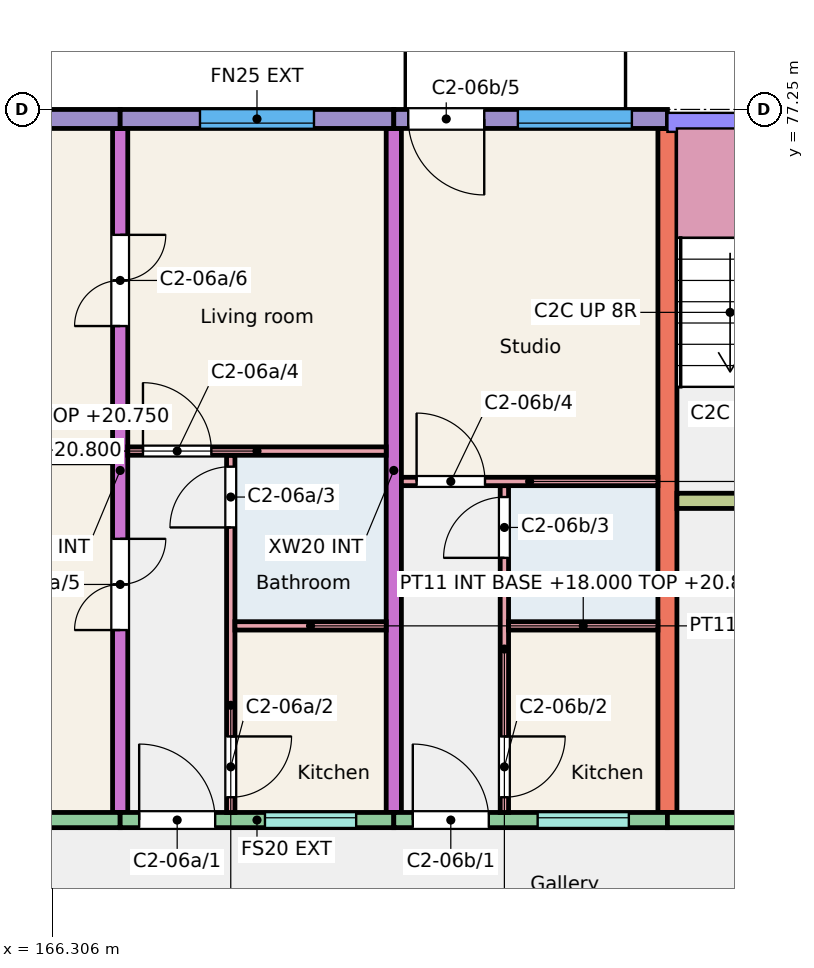
"""IFC4 building model, lengths in metres.
Left out: names, types, materials, properties, quantities, classifications, styles, units other than length and angle.
Written with IfcOpenShell. Run it as: python <this file> out.ifc"""

import sys

from ifc_helpers import new_model, si_unit, direction, frame, frame_2d, origin, place, context, subcontext, project, spatial, rectangle, extrude, element, fill, save


model = new_model("IFC4")
c1 = context("Model", 3, precision=1e-05, world=origin(), true_north=direction((0.0, 1.0)))
c2 = subcontext(c1, "Body", "Model", "MODEL_VIEW")
j1 = project(units=[si_unit("LENGTHUNIT", "METRE"), si_unit("PLANEANGLEUNIT", "RADIAN")], contexts=[c1])
p1 = place(None, origin())
s1 = spatial("IfcSite", under=j1, at=p1, CompositionType="ELEMENT")
p2 = place(p1, origin())
s2 = spatial("IfcBuilding", under=s1, at=p2, CompositionType="ELEMENT")
p3 = place(p2, frame((0.0, 0.0, 18.0)))
s3 = spatial("IfcBuildingStorey", under=s2, at=p3, CompositionType="ELEMENT", Elevation=18.0)
p4 = place(p3, frame((167.2, 68.0, 0.0), z_axis=(0.0, 0.0, 1.0), x_axis=(0.0, 1.0, 0.0)))
e1 = element("IfcWall", 1, at=p4, inside=s3, PredefinedType="SHEAR", context=c2, shape_type="SweptSolid", body=[
    extrude(rectangle(XDim=9.0, YDim=0.2, at=frame_2d((4.5, 0.0))), origin(), (0.0, 0.0, 1.0), 3.0),
])
p5 = place(p4, frame((2.4, 0.0, 0.0)))
e2 = element("IfcOpeningElement", 2, at=p5, cuts=e1, PredefinedType="OPENING", context=c2, shape_type="SweptSolid", body=[
    extrude(rectangle(XDim=1.2, YDim=2.1, at=frame_2d((0.6, 1.05))), frame((0.0, 0.11, 0.0), z_axis=(0.0, -1.0, 0.0), x_axis=(1.0, 0.0, 0.0)), (0.0, 0.0, 1.0), 0.22),
])
p6 = place(p4, frame((6.4, 0.0, 0.0)))
e3 = element("IfcOpeningElement", 3, at=p6, cuts=e1, PredefinedType="OPENING", context=c2, shape_type="SweptSolid", body=[
    extrude(rectangle(XDim=1.2, YDim=2.1, at=frame_2d((0.6, 1.05))), frame((0.0, 0.11, 0.0), z_axis=(0.0, -1.0, 0.0), x_axis=(1.0, 0.0, 0.0)), (0.0, 0.0, 1.0), 0.22),
])
p7 = place(p3, frame((170.8, 68.0, 0.0), z_axis=(0.0, 0.0, 1.0), x_axis=(0.0, 1.0, 0.0)))
e4 = element("IfcWall", 4, at=p7, inside=s3, PredefinedType="SHEAR", context=c2, shape_type="SweptSolid", body=[
    extrude(rectangle(XDim=9.0, YDim=0.2, at=frame_2d((4.5, 0.0))), origin(), (0.0, 0.0, 1.0), 3.0),
])
p8 = place(p3, frame((174.4, 68.0, 0.0), z_axis=(0.0, 0.0, 1.0), x_axis=(0.0, 1.0, 0.0)))
e5 = element("IfcWall", 5, at=p8, inside=s3, PredefinedType="SHEAR", context=c2, shape_type="SweptSolid", body=[
    extrude(rectangle(XDim=9.0, YDim=0.25, at=frame_2d((4.5, 0.0))), origin(), (0.0, 0.0, 1.0), 3.0),
])
p9 = place(p3, frame((163.6, 77.125, 0.0), z_axis=(0.0, 0.0, 1.0), x_axis=(1.0, 0.0, 0.0)))
e6 = element("IfcWall", 6, at=p9, inside=s3, PredefinedType="SOLIDWALL", context=c2, shape_type="SweptSolid", body=[
    extrude(rectangle(XDim=3.6, YDim=0.25, at=frame_2d((1.8, 0.0))), origin(), (0.0, 0.0, 1.0), 3.0),
])
p10 = place(p9, frame((1.075, 0.0, 0.9)))
e7 = element("IfcOpeningElement", 7, at=p10, cuts=e6, PredefinedType="OPENING", context=c2, shape_type="SweptSolid", body=[
    extrude(rectangle(XDim=1.5, YDim=1.5, at=frame_2d((0.75, 0.75))), frame((0.0, 0.135, 0.0), z_axis=(0.0, -1.0, 0.0), x_axis=(1.0, 0.0, 0.0)), (0.0, 0.0, 1.0), 0.27),
])
p11 = place(p3, frame((163.75, 67.9, 0.0), z_axis=(0.0, 0.0, 1.0), x_axis=(1.0, 0.0, 0.0)))
e8 = element("IfcWall", 8, at=p11, inside=s3, PredefinedType="SOLIDWALL", context=c2, shape_type="SweptSolid", body=[
    extrude(rectangle(XDim=3.45, YDim=0.2, at=frame_2d((1.725, 0.0))), origin(), (0.0, 0.0, 1.0), 3.0),
])
p12 = place(p11, frame((0.925, 0.0, 0.9)))
e9 = element("IfcOpeningElement", 9, at=p12, cuts=e8, PredefinedType="OPENING", context=c2, shape_type="SweptSolid", body=[
    extrude(rectangle(XDim=1.5, YDim=1.5, at=frame_2d((0.75, 0.75))), frame((0.0, 0.11, 0.0), z_axis=(0.0, -1.0, 0.0), x_axis=(1.0, 0.0, 0.0)), (0.0, 0.0, 1.0), 0.22),
])
p13 = place(p3, frame((167.2, 77.125, 0.0), z_axis=(0.0, 0.0, 1.0), x_axis=(1.0, 0.0, 0.0)))
e10 = element("IfcWall", 10, at=p13, inside=s3, PredefinedType="SOLIDWALL", context=c2, shape_type="SweptSolid", body=[
    extrude(rectangle(XDim=3.6, YDim=0.25, at=frame_2d((1.8, 0.0))), origin(), (0.0, 0.0, 1.0), 3.0),
])
p14 = place(p13, frame((1.05, 0.0, 0.9)))
e11 = element("IfcOpeningElement", 11, at=p14, cuts=e10, PredefinedType="OPENING", context=c2, shape_type="SweptSolid", body=[
    extrude(rectangle(XDim=1.5, YDim=1.5, at=frame_2d((0.75, 0.75))), frame((0.0, 0.135, 0.0), z_axis=(0.0, -1.0, 0.0), x_axis=(1.0, 0.0, 0.0)), (0.0, 0.0, 1.0), 0.27),
])
p15 = place(p3, frame((167.2, 67.9, 0.0), z_axis=(0.0, 0.0, 1.0), x_axis=(1.0, 0.0, 0.0)))
e12 = element("IfcWall", 12, at=p15, inside=s3, PredefinedType="SOLIDWALL", context=c2, shape_type="SweptSolid", body=[
    extrude(rectangle(XDim=3.6, YDim=0.2, at=frame_2d((1.8, 0.0))), origin(), (0.0, 0.0, 1.0), 3.0),
])
p16 = place(p15, frame((1.905, 0.0, 1.1)))
e13 = element("IfcOpeningElement", 13, at=p16, cuts=e12, PredefinedType="OPENING", context=c2, shape_type="SweptSolid", body=[
    extrude(rectangle(XDim=1.2, YDim=1.3, at=frame_2d((0.6, 0.65))), frame((0.0, 0.11, 0.0), z_axis=(0.0, -1.0, 0.0), x_axis=(1.0, 0.0, 0.0)), (0.0, 0.0, 1.0), 0.22),
])
p17 = place(p15, frame((0.25, 0.0, 0.0)))
e14 = element("IfcOpeningElement", 14, at=p17, cuts=e12, PredefinedType="OPENING", context=c2, shape_type="SweptSolid", body=[
    extrude(rectangle(XDim=1.0, YDim=2.1, at=frame_2d((0.5, 1.05))), frame((0.0, 0.11, 0.0), z_axis=(0.0, -1.0, 0.0), x_axis=(1.0, 0.0, 0.0)), (0.0, 0.0, 1.0), 0.22),
])
p18 = place(p3, frame((170.8, 77.125, 0.0), z_axis=(0.0, 0.0, 1.0), x_axis=(1.0, 0.0, 0.0)))
e15 = element("IfcWall", 15, at=p18, inside=s3, PredefinedType="SOLIDWALL", context=c2, shape_type="SweptSolid", body=[
    extrude(rectangle(XDim=3.6, YDim=0.25, at=frame_2d((1.8, 0.0))), origin(), (0.0, 0.0, 1.0), 3.0),
])
p19 = place(p18, frame((1.633, 0.0, 0.9)))
e16 = element("IfcOpeningElement", 16, at=p19, cuts=e15, PredefinedType="OPENING", context=c2, shape_type="SweptSolid", body=[
    extrude(rectangle(XDim=1.5, YDim=1.5, at=frame_2d((0.75, 0.75))), frame((0.0, 0.135, 0.0), z_axis=(0.0, -1.0, 0.0), x_axis=(1.0, 0.0, 0.0)), (0.0, 0.0, 1.0), 0.27),
])
p20 = place(p18, frame((0.19, 0.0, 0.0)))
e17 = element("IfcOpeningElement", 17, at=p20, cuts=e15, PredefinedType="OPENING", context=c2, shape_type="SweptSolid", body=[
    extrude(rectangle(XDim=1.0, YDim=2.1, at=frame_2d((0.5, 1.05))), frame((0.0, 0.135, 0.0), z_axis=(0.0, -1.0, 0.0), x_axis=(1.0, 0.0, 0.0)), (0.0, 0.0, 1.0), 0.27),
])
p21 = place(p3, frame((170.8, 67.9, 0.0), z_axis=(0.0, 0.0, 1.0), x_axis=(1.0, 0.0, 0.0)))
e18 = element("IfcWall", 18, at=p21, inside=s3, PredefinedType="SOLIDWALL", context=c2, shape_type="SweptSolid", body=[
    extrude(rectangle(XDim=3.6, YDim=0.2, at=frame_2d((1.8, 0.0))), origin(), (0.0, 0.0, 1.0), 3.0),
])
p22 = place(p21, frame((1.893, 0.0, 1.1)))
e19 = element("IfcOpeningElement", 19, at=p22, cuts=e18, PredefinedType="OPENING", context=c2, shape_type="SweptSolid", body=[
    extrude(rectangle(XDim=1.2, YDim=1.3, at=frame_2d((0.6, 0.65))), frame((0.0, 0.11, 0.0), z_axis=(0.0, -1.0, 0.0), x_axis=(1.0, 0.0, 0.0)), (0.0, 0.0, 1.0), 0.22),
])
p23 = place(p21, frame((0.25, 0.0, 0.0)))
e20 = element("IfcOpeningElement", 20, at=p23, cuts=e18, PredefinedType="OPENING", context=c2, shape_type="SweptSolid", body=[
    extrude(rectangle(XDim=1.0, YDim=2.1, at=frame_2d((0.5, 1.05))), frame((0.0, 0.11, 0.0), z_axis=(0.0, -1.0, 0.0), x_axis=(1.0, 0.0, 0.0)), (0.0, 0.0, 1.0), 0.22),
])
p24 = place(p3, frame((174.4, 67.9, 0.0), z_axis=(0.0, 0.0, 1.0), x_axis=(1.0, 0.0, 0.0)))
e21 = element("IfcWall", 21, at=p24, inside=s3, PredefinedType="SHEAR", context=c2, shape_type="SweptSolid", body=[
    extrude(rectangle(XDim=5.85, YDim=0.2, at=frame_2d((2.925, 0.0))), origin(), (0.0, 0.0, 1.0), 3.0),
])
p25 = place(p24, frame((2.438, 0.0, 0.0)))
e22 = element("IfcOpeningElement", 22, at=p25, cuts=e21, PredefinedType="OPENING", context=c2, shape_type="SweptSolid", body=[
    extrude(rectangle(XDim=1.1, YDim=2.1, at=frame_2d((0.55, 1.05))), frame((0.0, 0.11, 0.0), z_axis=(0.0, -1.0, 0.0), x_axis=(1.0, 0.0, 0.0)), (0.0, 0.0, 1.0), 0.22),
])
p26 = place(p3, frame((174.525, 72.1, 0.0), z_axis=(0.0, 0.0, 1.0), x_axis=(1.0, 0.0, 0.0)))
e23 = element("IfcWall", 23, at=p26, inside=s3, PredefinedType="SHEAR", context=c2, shape_type="SweptSolid", body=[
    extrude(rectangle(XDim=5.725, YDim=0.2, at=frame_2d((2.863, 0.0))), origin(), (0.0, 0.0, 1.0), 3.0),
])
p27 = place(p26, frame((0.95, 0.0, 0.0)))
e24 = element("IfcOpeningElement", 24, at=p27, cuts=e23, PredefinedType="OPENING", context=c2, shape_type="SweptSolid", body=[
    extrude(rectangle(XDim=1.0, YDim=2.1, at=frame_2d((0.5, 1.05))), frame((0.0, 0.11, 0.0), z_axis=(0.0, -1.0, 0.0), x_axis=(1.0, 0.0, 0.0)), (0.0, 0.0, 1.0), 0.22),
])
p28 = place(p26, frame((3.863, 0.0, 0.0)))
e25 = element("IfcOpeningElement", 25, at=p28, cuts=e23, PredefinedType="OPENING", context=c2, shape_type="SweptSolid", body=[
    extrude(rectangle(XDim=1.1, YDim=2.1, at=frame_2d((0.55, 1.05))), frame((0.0, 0.11, 0.0), z_axis=(0.0, -1.0, 0.0), x_axis=(1.0, 0.0, 0.0)), (0.0, 0.0, 1.0), 0.22),
])
p29 = place(p3, frame((168.655, 68.0, 0.0), z_axis=(0.0, 0.0, 1.0), x_axis=(0.0, 1.0, 0.0)))
e26 = element("IfcWall", 26, at=p29, inside=s3, PredefinedType="PARTITIONING", context=c2, shape_type="SweptSolid", body=[
    extrude(rectangle(XDim=4.7, YDim=0.11, at=frame_2d((2.35, 0.0))), origin(), (0.0, 0.0, 1.0), 2.8),
])
p30 = place(p29, frame((0.2, 0.0, 0.0)))
e27 = element("IfcOpeningElement", 27, at=p30, cuts=e26, PredefinedType="OPENING", context=c2, shape_type="SweptSolid", body=[
    extrude(rectangle(XDim=0.8, YDim=2.1, at=frame_2d((0.4, 1.05))), frame((0.0, 0.065, 0.0), z_axis=(0.0, -1.0, 0.0), x_axis=(1.0, 0.0, 0.0)), (0.0, 0.0, 1.0), 0.13),
])
p31 = place(p29, frame((3.75, 0.0, 0.0)))
e28 = element("IfcOpeningElement", 28, at=p31, cuts=e26, PredefinedType="OPENING", context=c2, shape_type="SweptSolid", body=[
    extrude(rectangle(XDim=0.8, YDim=2.1, at=frame_2d((0.4, 1.05))), frame((0.0, 0.065, 0.0), z_axis=(0.0, -1.0, 0.0), x_axis=(1.0, 0.0, 0.0)), (0.0, 0.0, 1.0), 0.13),
])
p32 = place(p3, frame((168.71, 70.455, 0.0), z_axis=(0.0, 0.0, 1.0), x_axis=(1.0, 0.0, 0.0)))
e29 = element("IfcWall", 29, at=p32, inside=s3, PredefinedType="PARTITIONING", context=c2, shape_type="SweptSolid", body=[
    extrude(rectangle(XDim=1.99, YDim=0.11, at=frame_2d((0.995, 0.0))), origin(), (0.0, 0.0, 1.0), 2.8),
])
p33 = place(p3, frame((167.3, 72.755, 0.0), z_axis=(0.0, 0.0, 1.0), x_axis=(1.0, 0.0, 0.0)))
e30 = element("IfcWall", 30, at=p33, inside=s3, PredefinedType="PARTITIONING", context=c2, shape_type="SweptSolid", body=[
    extrude(rectangle(XDim=3.4, YDim=0.11, at=frame_2d((1.7, 0.0))), origin(), (0.0, 0.0, 1.0), 2.8),
])
p34 = place(p33, frame((0.2, 0.0, 0.0)))
e31 = element("IfcOpeningElement", 31, at=p34, cuts=e30, PredefinedType="OPENING", context=c2, shape_type="SweptSolid", body=[
    extrude(rectangle(XDim=0.9, YDim=2.1, at=frame_2d((0.45, 1.05))), frame((0.0, 0.065, 0.0), z_axis=(0.0, -1.0, 0.0), x_axis=(1.0, 0.0, 0.0)), (0.0, 0.0, 1.0), 0.13),
])
p35 = place(p3, frame((163.75, 72.655, 0.0), z_axis=(0.0, 0.0, 1.0), x_axis=(1.0, 0.0, 0.0)))
e32 = element("IfcWall", 32, at=p35, inside=s3, PredefinedType="PARTITIONING", context=c2, shape_type="SweptSolid", body=[
    extrude(rectangle(XDim=3.35, YDim=0.11, at=frame_2d((1.675, 0.0))), origin(), (0.0, 0.0, 1.0), 2.75),
])
p36 = place(p3, frame((172.255, 68.0, 0.0), z_axis=(0.0, 0.0, 1.0), x_axis=(0.0, 1.0, 0.0)))
e33 = element("IfcWall", 33, at=p36, inside=s3, PredefinedType="PARTITIONING", context=c2, shape_type="SweptSolid", body=[
    extrude(rectangle(XDim=4.3, YDim=0.11, at=frame_2d((2.15, 0.0))), origin(), (0.0, 0.0, 1.0), 2.8),
])
p37 = place(p36, frame((0.2, 0.0, 0.0)))
e34 = element("IfcOpeningElement", 34, at=p37, cuts=e33, PredefinedType="OPENING", context=c2, shape_type="SweptSolid", body=[
    extrude(rectangle(XDim=0.8, YDim=2.1, at=frame_2d((0.4, 1.05))), frame((0.0, 0.065, 0.0), z_axis=(0.0, -1.0, 0.0), x_axis=(1.0, 0.0, 0.0)), (0.0, 0.0, 1.0), 0.13),
])
p38 = place(p36, frame((3.35, 0.0, 0.0)))
e35 = element("IfcOpeningElement", 35, at=p38, cuts=e33, PredefinedType="OPENING", context=c2, shape_type="SweptSolid", body=[
    extrude(rectangle(XDim=0.8, YDim=2.1, at=frame_2d((0.4, 1.05))), frame((0.0, 0.065, 0.0), z_axis=(0.0, -1.0, 0.0), x_axis=(1.0, 0.0, 0.0)), (0.0, 0.0, 1.0), 0.13),
])
p39 = place(p3, frame((172.31, 70.455, 0.0), z_axis=(0.0, 0.0, 1.0), x_axis=(1.0, 0.0, 0.0)))
e36 = element("IfcWall", 36, at=p39, inside=s3, PredefinedType="PARTITIONING", context=c2, shape_type="SweptSolid", body=[
    extrude(rectangle(XDim=1.965, YDim=0.11, at=frame_2d((0.982, 0.0))), origin(), (0.0, 0.0, 1.0), 2.8),
])
p40 = place(p3, frame((170.9, 72.355, 0.0), z_axis=(0.0, 0.0, 1.0), x_axis=(1.0, 0.0, 0.0)))
e37 = element("IfcWall", 37, at=p40, inside=s3, PredefinedType="PARTITIONING", context=c2, shape_type="SweptSolid", body=[
    extrude(rectangle(XDim=3.375, YDim=0.11, at=frame_2d((1.688, 0.0))), origin(), (0.0, 0.0, 1.0), 2.8),
])
p41 = place(p40, frame((0.2, 0.0, 0.0)))
e38 = element("IfcOpeningElement", 38, at=p41, cuts=e37, PredefinedType="OPENING", context=c2, shape_type="SweptSolid", body=[
    extrude(rectangle(XDim=0.9, YDim=2.1, at=frame_2d((0.45, 1.05))), frame((0.0, 0.065, 0.0), z_axis=(0.0, -1.0, 0.0), x_axis=(1.0, 0.0, 0.0)), (0.0, 0.0, 1.0), 0.13),
])
p42 = place(p16, origin())
e39 = element("IfcWindow", 39, at=p42, inside=s3, PartitioningType="SINGLE_PANEL", PredefinedType="WINDOW", context=c2, shape_type="SweptSolid", body=[
    extrude(rectangle(XDim=1.2, YDim=1.3, at=frame_2d((0.6, 0.65))), frame((0.0, 0.06, 0.0), z_axis=(0.0, -1.0, 0.0), x_axis=(1.0, 0.0, 0.0)), (0.0, 0.0, 1.0), 0.06),
])
fill(e13, e39)
p43 = place(p14, origin())
e40 = element("IfcWindow", 40, at=p43, inside=s3, PartitioningType="SINGLE_PANEL", PredefinedType="WINDOW", context=c2, shape_type="SweptSolid", body=[
    extrude(rectangle(XDim=1.5, YDim=1.5, at=frame_2d((0.75, 0.75))), frame((0.0, -0.025, 0.0), z_axis=(0.0, -1.0, 0.0), x_axis=(1.0, 0.0, 0.0)), (0.0, 0.0, 1.0), 0.06),
])
fill(e11, e40)
p44 = place(p22, origin())
e41 = element("IfcWindow", 41, at=p44, inside=s3, PartitioningType="SINGLE_PANEL", PredefinedType="WINDOW", context=c2, shape_type="SweptSolid", body=[
    extrude(rectangle(XDim=1.2, YDim=1.3, at=frame_2d((0.6, 0.65))), frame((0.0, 0.06, 0.0), z_axis=(0.0, -1.0, 0.0), x_axis=(1.0, 0.0, 0.0)), (0.0, 0.0, 1.0), 0.06),
])
fill(e19, e41)
p45 = place(p19, origin())
e42 = element("IfcWindow", 42, at=p45, inside=s3, PartitioningType="SINGLE_PANEL", PredefinedType="WINDOW", context=c2, shape_type="SweptSolid", body=[
    extrude(rectangle(XDim=1.5, YDim=1.5, at=frame_2d((0.75, 0.75))), frame((0.0, -0.025, 0.0), z_axis=(0.0, -1.0, 0.0), x_axis=(1.0, 0.0, 0.0)), (0.0, 0.0, 1.0), 0.06),
])
fill(e16, e42)
p46 = place(p17, origin())
e43 = element("IfcDoor", 43, at=p46, inside=s3, OperationType="SINGLE_SWING_LEFT", PredefinedType="DOOR", context=c2, shape_type="SweptSolid", body=[
    extrude(rectangle(XDim=1.0, YDim=2.1, at=frame_2d((0.5, 1.05))), frame((0.0, 0.025, 0.0), z_axis=(0.0, -1.0, 0.0), x_axis=(1.0, 0.0, 0.0)), (0.0, 0.0, 1.0), 0.05),
])
fill(e14, e43)
p47 = place(p30, origin())
e44 = element("IfcDoor", 44, at=p47, inside=s3, OperationType="SINGLE_SWING_RIGHT", PredefinedType="DOOR", context=c2, shape_type="SweptSolid", body=[
    extrude(rectangle(XDim=0.8, YDim=2.1, at=frame_2d((0.4, 1.05))), frame((0.0, 0.025, 0.0), z_axis=(0.0, -1.0, 0.0), x_axis=(1.0, 0.0, 0.0)), (0.0, 0.0, 1.0), 0.05),
])
fill(e27, e44)
p48 = place(p31, origin())
e45 = element("IfcDoor", 45, at=p48, inside=s3, OperationType="SINGLE_SWING_LEFT", PredefinedType="DOOR", context=c2, shape_type="SweptSolid", body=[
    extrude(rectangle(XDim=0.8, YDim=2.1, at=frame_2d((0.4, 1.05))), frame((0.0, 0.025, 0.0), z_axis=(0.0, -1.0, 0.0), x_axis=(1.0, 0.0, 0.0)), (0.0, 0.0, 1.0), 0.05),
])
fill(e28, e45)
p49 = place(p34, origin())
e46 = element("IfcDoor", 46, at=p49, inside=s3, OperationType="SINGLE_SWING_LEFT", PredefinedType="DOOR", context=c2, shape_type="SweptSolid", body=[
    extrude(rectangle(XDim=0.9, YDim=2.1, at=frame_2d((0.45, 1.05))), frame((0.0, 0.025, 0.0), z_axis=(0.0, -1.0, 0.0), x_axis=(1.0, 0.0, 0.0)), (0.0, 0.0, 1.0), 0.05),
])
fill(e31, e46)
p50 = place(p5, origin())
e47 = element("IfcDoor", 47, at=p50, inside=s3, OperationType="DOUBLE_DOOR_SINGLE_SWING", PredefinedType="DOOR", context=c2, shape_type="SweptSolid", body=[
    extrude(rectangle(XDim=1.2, YDim=2.1, at=frame_2d((0.6, 1.05))), frame((0.0, 0.025, 0.0), z_axis=(0.0, -1.0, 0.0), x_axis=(1.0, 0.0, 0.0)), (0.0, 0.0, 1.0), 0.05),
])
fill(e2, e47)
p51 = place(p6, origin())
e48 = element("IfcDoor", 48, at=p51, inside=s3, OperationType="DOUBLE_DOOR_SINGLE_SWING", PredefinedType="DOOR", context=c2, shape_type="SweptSolid", body=[
    extrude(rectangle(XDim=1.2, YDim=2.1, at=frame_2d((0.6, 1.05))), frame((0.0, 0.025, 0.0), z_axis=(0.0, -1.0, 0.0), x_axis=(1.0, 0.0, 0.0)), (0.0, 0.0, 1.0), 0.05),
])
fill(e3, e48)
p52 = place(p23, origin())
e49 = element("IfcDoor", 49, at=p52, inside=s3, OperationType="SINGLE_SWING_LEFT", PredefinedType="DOOR", context=c2, shape_type="SweptSolid", body=[
    extrude(rectangle(XDim=1.0, YDim=2.1, at=frame_2d((0.5, 1.05))), frame((0.0, 0.025, 0.0), z_axis=(0.0, -1.0, 0.0), x_axis=(1.0, 0.0, 0.0)), (0.0, 0.0, 1.0), 0.05),
])
fill(e20, e49)
p53 = place(p37, origin())
e50 = element("IfcDoor", 50, at=p53, inside=s3, OperationType="SINGLE_SWING_RIGHT", PredefinedType="DOOR", context=c2, shape_type="SweptSolid", body=[
    extrude(rectangle(XDim=0.8, YDim=2.1, at=frame_2d((0.4, 1.05))), frame((0.0, 0.025, 0.0), z_axis=(0.0, -1.0, 0.0), x_axis=(1.0, 0.0, 0.0)), (0.0, 0.0, 1.0), 0.05),
])
fill(e34, e50)
p54 = place(p38, origin())
e51 = element("IfcDoor", 51, at=p54, inside=s3, OperationType="SINGLE_SWING_LEFT", PredefinedType="DOOR", context=c2, shape_type="SweptSolid", body=[
    extrude(rectangle(XDim=0.8, YDim=2.1, at=frame_2d((0.4, 1.05))), frame((0.0, 0.025, 0.0), z_axis=(0.0, -1.0, 0.0), x_axis=(1.0, 0.0, 0.0)), (0.0, 0.0, 1.0), 0.05),
])
fill(e35, e51)
p55 = place(p41, origin())
e52 = element("IfcDoor", 52, at=p55, inside=s3, OperationType="SINGLE_SWING_LEFT", PredefinedType="DOOR", context=c2, shape_type="SweptSolid", body=[
    extrude(rectangle(XDim=0.9, YDim=2.1, at=frame_2d((0.45, 1.05))), frame((0.0, 0.025, 0.0), z_axis=(0.0, -1.0, 0.0), x_axis=(1.0, 0.0, 0.0)), (0.0, 0.0, 1.0), 0.05),
])
fill(e38, e52)
p56 = place(p20, origin())
e53 = element("IfcDoor", 53, at=p56, inside=s3, OperationType="SINGLE_SWING_RIGHT", PredefinedType="DOOR", context=c2, shape_type="SweptSolid", body=[
    extrude(rectangle(XDim=1.0, YDim=2.1, at=frame_2d((0.5, 1.05))), frame((0.0, 0.025, 0.0), z_axis=(0.0, -1.0, 0.0), x_axis=(1.0, 0.0, 0.0)), (0.0, 0.0, 1.0), 0.05),
])
fill(e17, e53)
save(model, sys.argv[1])
